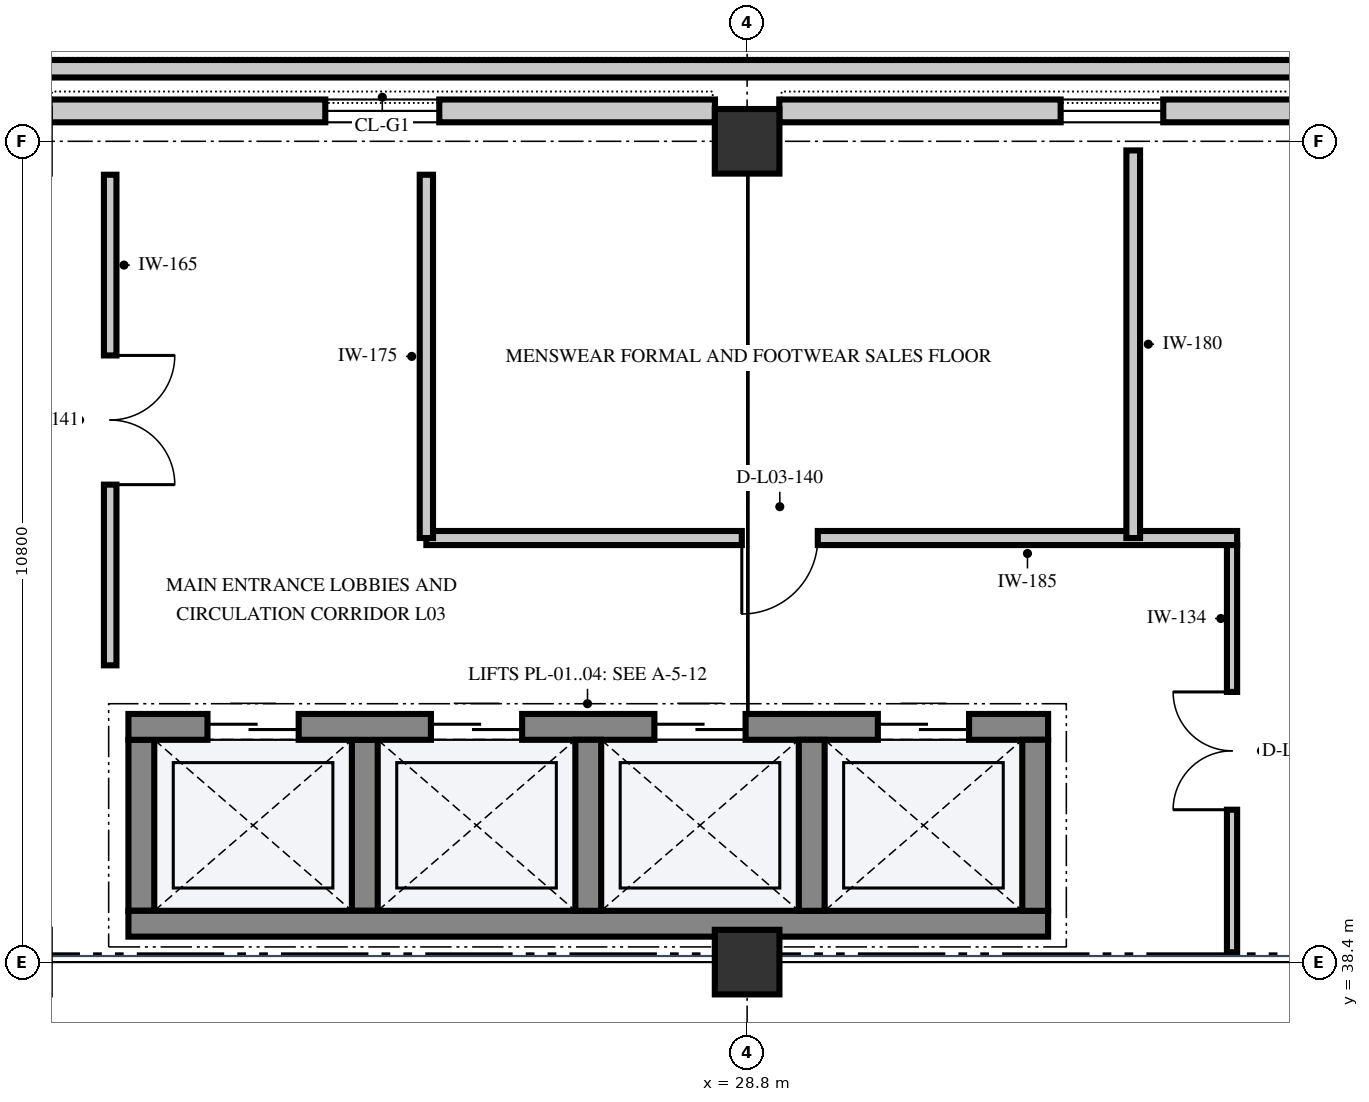
"""IFC4 building model, lengths in metres.
Left out: names, types, materials, properties, quantities, classifications, styles, units other than length and angle.
Written with IfcOpenShell. Run it as: python <this file> out.ifc"""

import sys

from ifc_helpers import new_model, si_unit, direction, frame, frame_2d, origin, origin_2d, place, context, subcontext, project, spatial, rectangle, extrude, element, fill, save


model = new_model("IFC4")
c1 = context("Model", 3, precision=1e-05, world=origin(), true_north=direction((0.0, 1.0)))
c2 = subcontext(c1, "Body", "Model", "MODEL_VIEW")
j1 = project(units=[si_unit("LENGTHUNIT", "METRE"), si_unit("PLANEANGLEUNIT", "RADIAN")], contexts=[c1])
p1 = place(None, origin())
s1 = spatial("IfcSite", under=j1, at=p1, CompositionType="ELEMENT")
p2 = place(p1, origin())
s2 = spatial("IfcBuilding", under=s1, at=p2, CompositionType="ELEMENT")
p3 = place(p2, frame((0.0, 0.0, 15.0)))
s3 = spatial("IfcBuildingStorey", under=s2, at=p3, CompositionType="ELEMENT", Elevation=15.0)
for number, where, z_axis, x_axis in (
    (1, (28.8, 38.4, 0.0), (0.0, 0.0, 1.0), (1.0, 0.0, 0.0)),
    (2, (28.8, 49.2, 0.0), (0.0, 0.0, 1.0), (1.0, 0.0, 0.0)),
):
    element("IfcColumn", number, at=place(p3, frame(where, z_axis=z_axis, x_axis=x_axis)), inside=s3, PredefinedType="COLUMN", context=c2, shape_type="SweptSolid", body=[
        extrude(rectangle(XDim=0.85, YDim=0.85, at=origin_2d()), origin(), (0.0, 0.0, 1.0), 4.8),
    ])
p4 = place(p3, frame((19.623, 49.6, 0.0), z_axis=(0.0, 0.0, 1.0), x_axis=(1.0, 0.0, 0.0)))
e3 = element("IfcWall", 3, at=p4, inside=s3, PredefinedType="SOLIDWALL", context=c2, shape_type="SweptSolid", body=[
    extrude(rectangle(XDim=8.754, YDim=0.3, at=frame_2d((4.377, 0.0))), origin(), (0.0, 0.0, 1.0), 3.46),
])
p5 = place(p4, frame((3.627, 0.0, 1.2)))
e4 = element("IfcOpeningElement", 4, at=p5, cuts=e3, PredefinedType="OPENING", context=c2, shape_type="SweptSolid", body=[
    extrude(rectangle(XDim=1.5, YDim=1.5, at=frame_2d((0.75, 0.75))), frame((0.0, 0.162, 0.0), z_axis=(0.0, -1.0, 0.0), x_axis=(1.0, 0.0, 0.0)), (0.0, 0.0, 1.0), 0.324),
])
p6 = place(p3, frame((29.223, 49.6, 0.0), z_axis=(0.0, 0.0, 1.0), x_axis=(1.0, 0.0, 0.0)))
e5 = element("IfcWall", 5, at=p6, inside=s3, PredefinedType="SOLIDWALL", context=c2, shape_type="SweptSolid", body=[
    extrude(rectangle(XDim=8.754, YDim=0.3, at=frame_2d((4.377, 0.0))), origin(), (0.0, 0.0, 1.0), 3.46),
])
p7 = place(p6, frame((3.702, 0.0, 1.25)))
e6 = element("IfcOpeningElement", 6, at=p7, cuts=e5, PredefinedType="OPENING", context=c2, shape_type="SweptSolid", body=[
    extrude(rectangle(XDim=1.35, YDim=1.4, at=frame_2d((0.675, 0.7))), frame((0.0, 0.162, 0.0), z_axis=(0.0, -1.0, 0.0), x_axis=(1.0, 0.0, 0.0)), (0.0, 0.0, 1.0), 0.324),
])
p8 = place(p3, frame((58.02, 50.155, 0.0), z_axis=(0.0, 0.0, 1.0), x_axis=(-1.0, 0.0, 0.0)))
e7 = element("IfcWall", 7, at=p8, inside=s3, PredefinedType="PARAPET", context=c2, shape_type="SweptSolid", body=[
    extrude(rectangle(XDim=38.834, YDim=0.23, at=frame_2d((19.417, 0.0))), origin(), (0.0, 0.0, 1.0), 1.2),
])
for number, where, z_axis, x_axis in (
    (8, (23.77, 39.075, 0.0), (0.0, 0.0, 1.0), (0.0, 1.0, 0.0)),
    (9, (20.83, 39.075, 0.0), (0.0, 0.0, 1.0), (0.0, 1.0, 0.0)),
):
    element("IfcWall", number, at=place(p3, frame(where, z_axis=z_axis, x_axis=x_axis)), inside=s3, PredefinedType="SHEAR", context=c2, shape_type="SweptSolid", body=[
        extrude(rectangle(XDim=2.25, YDim=0.34, at=frame_2d((1.125, 0.0))), origin(), (0.0, 0.0, 1.0), 4.52),
    ])
p9 = place(p3, frame((20.66, 38.905, 0.0), z_axis=(0.0, 0.0, 1.0), x_axis=(1.0, 0.0, 0.0)))
e10 = element("IfcWall", 10, at=p9, inside=s3, PredefinedType="SHEAR", context=c2, shape_type="SweptSolid", body=[
    extrude(rectangle(XDim=12.1, YDim=0.34, at=frame_2d((6.05, 0.0))), origin(), (0.0, 0.0, 1.0), 4.52),
])
p10 = place(p3, frame((20.66, 41.495, 0.0), z_axis=(0.0, 0.0, 1.0), x_axis=(1.0, 0.0, 0.0)))
e11 = element("IfcWall", 11, at=p10, inside=s3, PredefinedType="SHEAR", context=c2, shape_type="SweptSolid", body=[
    extrude(rectangle(XDim=12.1, YDim=0.34, at=frame_2d((6.05, 0.0))), origin(), (0.0, 0.0, 1.0), 4.52),
])
p11 = place(p10, frame((1.04, 0.0, 0.0)))
e12 = element("IfcOpeningElement", 12, at=p11, cuts=e11, PredefinedType="OPENING", context=c2, shape_type="SweptSolid", body=[
    extrude(rectangle(XDim=1.2, YDim=2.2, at=frame_2d((0.6, 1.1))), frame((0.0, 0.182, 0.0), z_axis=(0.0, -1.0, 0.0), x_axis=(1.0, 0.0, 0.0)), (0.0, 0.0, 1.0), 0.364),
])
p12 = place(p10, frame((3.98, 0.0, 0.0)))
e13 = element("IfcOpeningElement", 13, at=p12, cuts=e11, PredefinedType="OPENING", context=c2, shape_type="SweptSolid", body=[
    extrude(rectangle(XDim=1.2, YDim=2.2, at=frame_2d((0.6, 1.1))), frame((0.0, 0.182, 0.0), z_axis=(0.0, -1.0, 0.0), x_axis=(1.0, 0.0, 0.0)), (0.0, 0.0, 1.0), 0.364),
])
p13 = place(p10, frame((6.92, 0.0, 0.0)))
e14 = element("IfcOpeningElement", 14, at=p13, cuts=e11, PredefinedType="OPENING", context=c2, shape_type="SweptSolid", body=[
    extrude(rectangle(XDim=1.2, YDim=2.2, at=frame_2d((0.6, 1.1))), frame((0.0, 0.182, 0.0), z_axis=(0.0, -1.0, 0.0), x_axis=(1.0, 0.0, 0.0)), (0.0, 0.0, 1.0), 0.364),
])
p14 = place(p10, frame((9.86, 0.0, 0.0)))
e15 = element("IfcOpeningElement", 15, at=p14, cuts=e11, PredefinedType="OPENING", context=c2, shape_type="SweptSolid", body=[
    extrude(rectangle(XDim=1.2, YDim=2.2, at=frame_2d((0.6, 1.1))), frame((0.0, 0.182, 0.0), z_axis=(0.0, -1.0, 0.0), x_axis=(1.0, 0.0, 0.0)), (0.0, 0.0, 1.0), 0.364),
])
for number, where, z_axis, x_axis in (
    (16, (26.71, 39.075, 0.0), (0.0, 0.0, 1.0), (0.0, 1.0, 0.0)),
    (17, (29.65, 39.075, 0.0), (0.0, 0.0, 1.0), (0.0, 1.0, 0.0)),
    (18, (32.59, 39.075, 0.0), (0.0, 0.0, 1.0), (0.0, 1.0, 0.0)),
):
    element("IfcWall", number, at=place(p3, frame(where, z_axis=z_axis, x_axis=x_axis)), inside=s3, PredefinedType="SHEAR", context=c2, shape_type="SweptSolid", body=[
        extrude(rectangle(XDim=2.25, YDim=0.34, at=frame_2d((1.125, 0.0))), origin(), (0.0, 0.0, 1.0), 4.52),
    ])
p15 = place(p3, frame((35.247, 43.98, 0.0), z_axis=(0.0, 0.0, 1.0), x_axis=(-1.0, 0.0, 0.0)))
e19 = element("IfcWall", 19, at=p15, inside=s3, PredefinedType="PARTITIONING", context=c2, shape_type="SweptSolid", body=[
    extrude(rectangle(XDim=10.667, YDim=0.185, at=frame_2d((5.333, 0.0))), origin(), (0.0, 0.0, 1.0), 4.52),
])
p16 = place(p15, frame((5.517, 0.0, 0.0)))
e20 = element("IfcOpeningElement", 20, at=p16, cuts=e19, PredefinedType="OPENING", context=c2, shape_type="SweptSolid", body=[
    extrude(rectangle(XDim=1.0, YDim=2.2, at=frame_2d((0.5, 1.1))), frame((0.0, 0.104, 0.0), z_axis=(0.0, -1.0, 0.0), x_axis=(1.0, 0.0, 0.0)), (0.0, 0.0, 1.0), 0.209),
])
p17 = place(p3, frame((33.88, 49.08, 0.0), z_axis=(0.0, 0.0, 1.0), x_axis=(0.0, -1.0, 0.0)))
e21 = element("IfcWall", 21, at=p17, inside=s3, PredefinedType="PARTITIONING", context=c2, shape_type="SweptSolid", body=[
    extrude(rectangle(XDim=5.1, YDim=0.18, at=frame_2d((2.55, 0.0))), origin(), (0.0, 0.0, 1.0), 3.46),
])
p18 = place(p3, frame((24.58, 43.98, 0.0), z_axis=(0.0, 0.0, 1.0), x_axis=(0.0, 1.0, 0.0)))
e22 = element("IfcWall", 22, at=p18, inside=s3, PredefinedType="PARTITIONING", context=c2, shape_type="SweptSolid", body=[
    extrude(rectangle(XDim=4.78, YDim=0.175, at=frame_2d((2.39, 0.0))), origin(), (0.0, 0.0, 1.0), 4.52),
])
p19 = place(p3, frame((20.42, 48.76, 0.0), z_axis=(0.0, 0.0, 1.0), x_axis=(0.0, -1.0, 0.0)))
e23 = element("IfcWall", 23, at=p19, inside=s3, PredefinedType="PARTITIONING", context=c2, shape_type="SweptSolid", body=[
    extrude(rectangle(XDim=6.455, YDim=0.165, at=frame_2d((3.228, 0.0))), origin(), (0.0, 0.0, 1.0), 4.52),
])
p20 = place(p19, frame((2.377, 0.0, 0.0)))
e24 = element("IfcOpeningElement", 24, at=p20, cuts=e23, PredefinedType="OPENING", context=c2, shape_type="SweptSolid", body=[
    extrude(rectangle(XDim=1.7, YDim=2.3, at=frame_2d((0.85, 1.15))), frame((0.0, 0.094, 0.0), z_axis=(0.0, -1.0, 0.0), x_axis=(1.0, 0.0, 0.0)), (0.0, 0.0, 1.0), 0.189),
])
p21 = place(p3, frame((35.18, 38.53, 0.0), z_axis=(0.0, 0.0, 1.0), x_axis=(0.0, 1.0, 0.0)))
e25 = element("IfcWall", 25, at=p21, inside=s3, PredefinedType="PARTITIONING", context=c2, shape_type="SweptSolid", body=[
    extrude(rectangle(XDim=5.357, YDim=0.134, at=frame_2d((2.679, 0.0))), origin(), (0.0, 0.0, 1.0), 4.52),
])
p22 = place(p21, frame((1.875, 0.0, 0.0)))
e26 = element("IfcOpeningElement", 26, at=p22, cuts=e25, PredefinedType="OPENING", context=c2, shape_type="SweptSolid", body=[
    extrude(rectangle(XDim=1.55, YDim=2.25, at=frame_2d((0.775, 1.125))), frame((0.0, 0.079, 0.0), z_axis=(0.0, -1.0, 0.0), x_axis=(1.0, 0.0, 0.0)), (0.0, 0.0, 1.0), 0.158),
])
p23 = place(p5, origin())
e27 = element("IfcWindow", 27, at=p23, inside=s3, PartitioningType="SINGLE_PANEL", PredefinedType="WINDOW", context=c2, shape_type="SweptSolid", body=[
    extrude(rectangle(XDim=1.5, YDim=1.5, at=frame_2d((0.75, 0.75))), frame((0.0, 0.03, 0.0), z_axis=(0.0, -1.0, 0.0), x_axis=(1.0, 0.0, 0.0)), (0.0, 0.0, 1.0), 0.06),
])
fill(e4, e27)
p24 = place(p7, origin())
e28 = element("IfcWindow", 28, at=p24, inside=s3, PartitioningType="SINGLE_PANEL", PredefinedType="WINDOW", context=c2, shape_type="SweptSolid", body=[
    extrude(rectangle(XDim=1.35, YDim=1.4, at=frame_2d((0.675, 0.7))), frame((0.0, 0.03, 0.0), z_axis=(0.0, -1.0, 0.0), x_axis=(1.0, 0.0, 0.0)), (0.0, 0.0, 1.0), 0.06),
])
fill(e6, e28)
p25 = place(p11, origin())
e29 = element("IfcDoor", 29, at=p25, inside=s3, OperationType="DOUBLE_DOOR_SLIDING", PredefinedType="DOOR", context=c2, shape_type="SweptSolid", body=[
    extrude(rectangle(XDim=1.2, YDim=2.2, at=frame_2d((0.6, 1.1))), frame((0.0, 0.025, 0.0), z_axis=(0.0, -1.0, 0.0), x_axis=(1.0, 0.0, 0.0)), (0.0, 0.0, 1.0), 0.05),
])
fill(e12, e29)
p26 = place(p12, origin())
e30 = element("IfcDoor", 30, at=p26, inside=s3, OperationType="DOUBLE_DOOR_SLIDING", PredefinedType="DOOR", context=c2, shape_type="SweptSolid", body=[
    extrude(rectangle(XDim=1.2, YDim=2.2, at=frame_2d((0.6, 1.1))), frame((0.0, 0.025, 0.0), z_axis=(0.0, -1.0, 0.0), x_axis=(1.0, 0.0, 0.0)), (0.0, 0.0, 1.0), 0.05),
])
fill(e13, e30)
p27 = place(p13, origin())
e31 = element("IfcDoor", 31, at=p27, inside=s3, OperationType="DOUBLE_DOOR_SLIDING", PredefinedType="DOOR", context=c2, shape_type="SweptSolid", body=[
    extrude(rectangle(XDim=1.2, YDim=2.2, at=frame_2d((0.6, 1.1))), frame((0.0, 0.025, 0.0), z_axis=(0.0, -1.0, 0.0), x_axis=(1.0, 0.0, 0.0)), (0.0, 0.0, 1.0), 0.05),
])
fill(e14, e31)
p28 = place(p14, origin())
e32 = element("IfcDoor", 32, at=p28, inside=s3, OperationType="DOUBLE_DOOR_SLIDING", PredefinedType="DOOR", context=c2, shape_type="SweptSolid", body=[
    extrude(rectangle(XDim=1.2, YDim=2.2, at=frame_2d((0.6, 1.1))), frame((0.0, 0.025, 0.0), z_axis=(0.0, -1.0, 0.0), x_axis=(1.0, 0.0, 0.0)), (0.0, 0.0, 1.0), 0.05),
])
fill(e15, e32)
p29 = place(p16, origin())
e33 = element("IfcDoor", 33, at=p29, inside=s3, OperationType="SINGLE_SWING_RIGHT", PredefinedType="DOOR", context=c2, shape_type="SweptSolid", body=[
    extrude(rectangle(XDim=1.0, YDim=2.2, at=frame_2d((0.5, 1.1))), frame((0.0, 0.025, 0.0), z_axis=(0.0, -1.0, 0.0), x_axis=(1.0, 0.0, 0.0)), (0.0, 0.0, 1.0), 0.05),
])
fill(e20, e33)
p30 = place(p20, origin())
e34 = element("IfcDoor", 34, at=p30, inside=s3, OperationType="DOUBLE_DOOR_SINGLE_SWING", PredefinedType="DOOR", context=c2, shape_type="SweptSolid", body=[
    extrude(rectangle(XDim=1.7, YDim=2.3, at=frame_2d((0.85, 1.15))), frame((0.0, 0.025, 0.0), z_axis=(0.0, -1.0, 0.0), x_axis=(1.0, 0.0, 0.0)), (0.0, 0.0, 1.0), 0.05),
])
fill(e24, e34)
p31 = place(p22, origin())
e35 = element("IfcDoor", 35, at=p31, inside=s3, OperationType="DOUBLE_DOOR_SINGLE_SWING", PredefinedType="DOOR", context=c2, shape_type="SweptSolid", body=[
    extrude(rectangle(XDim=1.55, YDim=2.25, at=frame_2d((0.775, 1.125))), frame((0.0, 0.025, 0.0), z_axis=(0.0, -1.0, 0.0), x_axis=(1.0, 0.0, 0.0)), (0.0, 0.0, 1.0), 0.05),
])
fill(e26, e35)
save(model, sys.argv[1])
